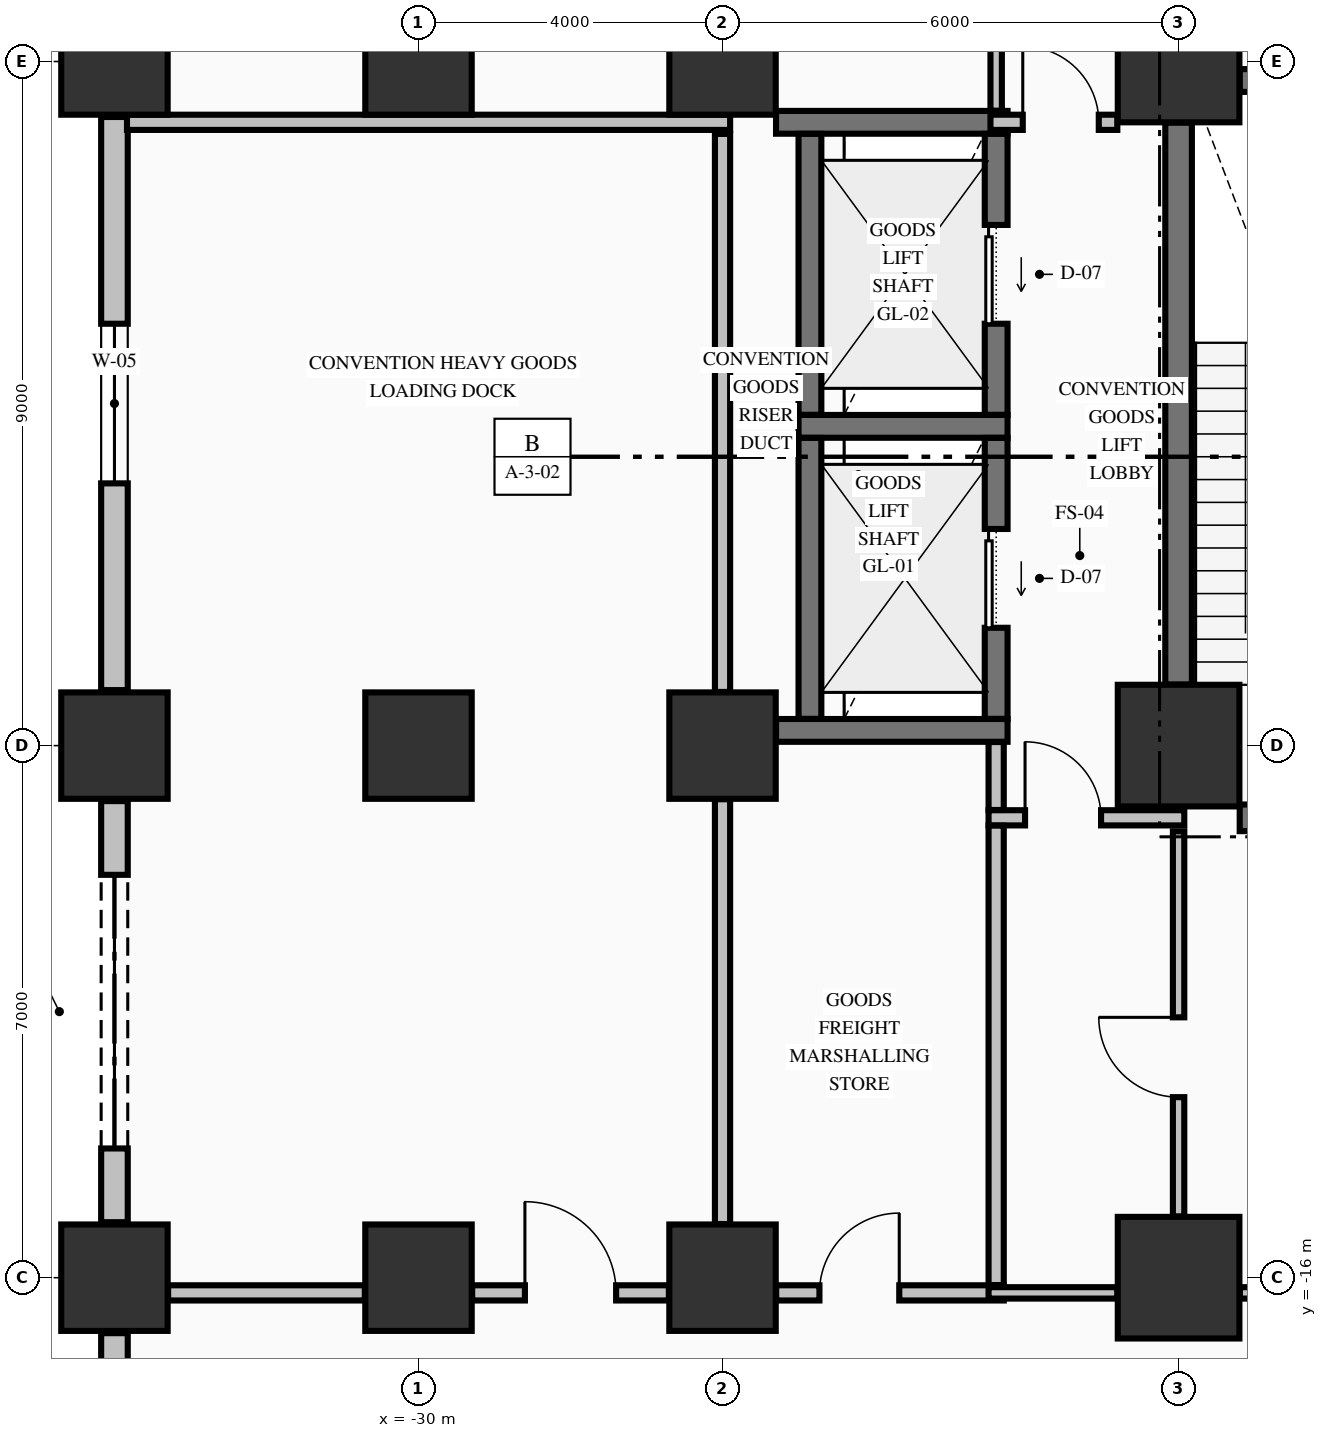
"""IFC4 building model, lengths in metres.
Left out: names, types, materials, properties, quantities, classifications, styles, units other than length and angle.
Written with IfcOpenShell. Run it as: python <this file> out.ifc"""

import sys

from ifc_helpers import new_model, si_unit, direction, frame, frame_2d, origin, origin_2d, place, context, subcontext, project, spatial, rectangle, extrude, element, fill, save


model = new_model("IFC4")
c1 = context("Model", 3, precision=1e-05, world=origin(), true_north=direction((0.0, 1.0)))
c2 = subcontext(c1, "Body", "Model", "MODEL_VIEW")
j1 = project(units=[si_unit("LENGTHUNIT", "METRE"), si_unit("PLANEANGLEUNIT", "RADIAN")], contexts=[c1])
p1 = place(None, origin())
s1 = spatial("IfcSite", under=j1, at=p1, CompositionType="ELEMENT")
p2 = place(p1, origin())
s2 = spatial("IfcBuilding", under=s1, at=p2, CompositionType="ELEMENT")
p3 = place(p2, origin())
s3 = spatial("IfcBuildingStorey", under=s2, at=p3, CompositionType="ELEMENT", Elevation=0.0)
for number, where, z_axis, x_axis in (
    (1, (-34.0, -16.0, 0.0), (0.0, 0.0, 1.0), (1.0, 0.0, 0.0)),
    (2, (-34.0, -9.0, 0.0), (0.0, 0.0, 1.0), (1.0, 0.0, 0.0)),
    (3, (-34.0, 0.0, 0.0), (0.0, 0.0, 1.0), (1.0, 0.0, 0.0)),
    (4, (-30.0, -16.0, 0.0), (0.0, 0.0, 1.0), (1.0, 0.0, 0.0)),
    (5, (-30.0, -9.0, 0.0), (0.0, 0.0, 1.0), (1.0, 0.0, 0.0)),
    (6, (-30.0, 0.0, 0.0), (0.0, 0.0, 1.0), (1.0, 0.0, 0.0)),
    (7, (-26.0, -16.0, 0.0), (0.0, 0.0, 1.0), (1.0, 0.0, 0.0)),
    (8, (-26.0, -9.0, 0.0), (0.0, 0.0, 1.0), (1.0, 0.0, 0.0)),
    (9, (-26.0, 0.0, 0.0), (0.0, 0.0, 1.0), (1.0, 0.0, 0.0)),
):
    element("IfcColumn", number, at=place(p3, frame(where, z_axis=z_axis, x_axis=x_axis)), inside=s3, PredefinedType="COLUMN", context=c2, shape_type="SweptSolid", body=[
        extrude(rectangle(XDim=1.4, YDim=1.4, at=origin_2d()), origin(), (0.0, 0.0, 1.0), 5.09),
    ])
for number, where, z_axis, x_axis in (
    (10, (-20.0, -16.0, 0.0), (0.0, 0.0, 1.0), (1.0, 0.0, 0.0)),
    (11, (-20.0, -9.0, 0.0), (0.0, 0.0, 1.0), (1.0, 0.0, 0.0)),
    (12, (-20.0, 0.0, 0.0), (0.0, 0.0, 1.0), (1.0, 0.0, 0.0)),
):
    element("IfcColumn", number, at=place(p3, frame(where, z_axis=z_axis, x_axis=x_axis)), inside=s3, PredefinedType="COLUMN", context=c2, shape_type="SweptSolid", body=[
        extrude(rectangle(XDim=1.6, YDim=1.6, at=origin_2d()), origin(), (0.0, 0.0, 1.0), 5.09),
    ])
p4 = place(p3, frame((-34.0, -21.27, 0.0), z_axis=(0.0, 0.0, 1.0), x_axis=(0.0, 1.0, 0.0)))
e13 = element("IfcWall", 13, at=p4, inside=s3, PredefinedType="STANDARD", context=c2, shape_type="SweptSolid", body=[
    extrude(rectangle(XDim=4.54, YDim=0.35, at=frame_2d((2.27, 0.0))), origin(), (0.0, 0.0, 1.0), 5.09),
])
p5 = place(p4, frame((0.87, 0.0, 0.0)))
e14 = element("IfcOpeningElement", 14, at=p5, cuts=e13, PredefinedType="OPENING", context=c2, shape_type="SweptSolid", body=[
    extrude(rectangle(XDim=1.2, YDim=2.2, at=frame_2d((0.6, 1.1))), frame((0.0, 0.185, 0.0), z_axis=(0.0, -1.0, 0.0), x_axis=(1.0, 0.0, 0.0)), (0.0, 0.0, 1.0), 0.37),
])
p6 = place(p3, frame((-34.0, -15.27, 0.0), z_axis=(0.0, 0.0, 1.0), x_axis=(0.0, 1.0, 0.0)))
e15 = element("IfcWall", 15, at=p6, inside=s3, PredefinedType="STANDARD", context=c2, shape_type="SweptSolid", body=[
    extrude(rectangle(XDim=5.54, YDim=0.35, at=frame_2d((2.77, 0.0))), origin(), (0.0, 0.0, 1.0), 4.482),
])
p7 = place(p6, frame((0.97, 0.0, 0.0)))
e16 = element("IfcOpeningElement", 16, at=p7, cuts=e15, PredefinedType="OPENING", context=c2, shape_type="SweptSolid", body=[
    extrude(rectangle(XDim=3.6, YDim=3.2, at=frame_2d((1.8, 1.6))), frame((0.0, 0.185, 0.0), z_axis=(0.0, -1.0, 0.0), x_axis=(1.0, 0.0, 0.0)), (0.0, 0.0, 1.0), 0.37),
])
p8 = place(p3, frame((-34.0, -8.27, 0.0), z_axis=(0.0, 0.0, 1.0), x_axis=(0.0, 1.0, 0.0)))
e17 = element("IfcWall", 17, at=p8, inside=s3, PredefinedType="STANDARD", context=c2, shape_type="SweptSolid", body=[
    extrude(rectangle(XDim=7.54, YDim=0.35, at=frame_2d((3.77, 0.0))), origin(), (0.0, 0.0, 1.0), 4.482),
])
p9 = place(p8, frame((2.72, 0.0, 0.75)))
e18 = element("IfcOpeningElement", 18, at=p9, cuts=e17, PredefinedType="OPENING", context=c2, shape_type="SweptSolid", body=[
    extrude(rectangle(XDim=2.1, YDim=1.75, at=frame_2d((1.05, 0.875))), frame((0.0, 0.185, 0.0), z_axis=(0.0, -1.0, 0.0), x_axis=(1.0, 0.0, 0.0)), (0.0, 0.0, 1.0), 0.37),
])
p10 = place(p3, frame((-19.196, -9.95, 0.0), z_axis=(0.0, 0.0, 1.0), x_axis=(1.0, 0.0, 0.0)))
e19 = element("IfcWall", 19, at=p10, inside=s3, PredefinedType="SHEAR", context=c2, shape_type="SweptSolid", body=[
    extrude(rectangle(XDim=4.496, YDim=0.35, at=frame_2d((2.248, 0.0))), origin(), (0.0, 0.0, 1.0), 5.09),
])
p11 = place(p10, frame((0.371, 0.0, 0.0)))
e20 = element("IfcOpeningElement", 20, at=p11, cuts=e19, PredefinedType="OPENING", context=c2, shape_type="SweptSolid", body=[
    extrude(rectangle(XDim=1.05, YDim=2.15, at=frame_2d((0.525, 1.075))), frame((0.0, 0.185, 0.0), z_axis=(0.0, -1.0, 0.0), x_axis=(1.0, 0.0, 0.0)), (0.0, 0.0, 1.0), 0.37),
])
p12 = place(p3, frame((-25.296, -8.8, 0.0), z_axis=(0.0, 0.0, 1.0), x_axis=(1.0, 0.0, 0.0)))
e21 = element("IfcWall", 21, at=p12, inside=s3, PredefinedType="SHEAR", context=c2, shape_type="SweptSolid", body=[
    extrude(rectangle(XDim=3.046, YDim=0.3, at=frame_2d((1.523, 0.0))), origin(), (0.0, 0.0, 1.0), 5.09),
])
p13 = place(p3, frame((-25.0, -4.8, 0.0), z_axis=(0.0, 0.0, 1.0), x_axis=(1.0, 0.0, 0.0)))
e22 = element("IfcWall", 22, at=p13, inside=s3, PredefinedType="SHEAR", context=c2, shape_type="SweptSolid", body=[
    extrude(rectangle(XDim=2.75, YDim=0.3, at=frame_2d((1.375, 0.0))), origin(), (0.0, 0.0, 1.0), 5.09),
])
p14 = place(p3, frame((-25.296, -0.8, 0.0), z_axis=(0.0, 0.0, 1.0), x_axis=(1.0, 0.0, 0.0)))
e23 = element("IfcWall", 23, at=p14, inside=s3, PredefinedType="SHEAR", context=c2, shape_type="SweptSolid", body=[
    extrude(rectangle(XDim=3.046, YDim=0.3, at=frame_2d((1.523, 0.0))), origin(), (0.0, 0.0, 1.0), 5.09),
])
p15 = place(p3, frame((-19.196, -0.25, 0.0), z_axis=(0.0, 0.0, 1.0), x_axis=(1.0, 0.0, 0.0)))
e24 = element("IfcWall", 24, at=p15, inside=s3, PredefinedType="SHEAR", context=c2, shape_type="SweptSolid", body=[
    extrude(rectangle(XDim=7.392, YDim=0.3, at=frame_2d((3.696, 0.0))), origin(), (0.0, 0.0, 1.0), 5.09),
])
p16 = place(p15, frame((5.496, 0.0, 0.0)))
e25 = element("IfcOpeningElement", 25, at=p16, cuts=e24, PredefinedType="OPENING", context=c2, shape_type="SweptSolid", body=[
    extrude(rectangle(XDim=1.1, YDim=2.15, at=frame_2d((0.55, 1.075))), frame((0.0, 0.16, 0.0), z_axis=(0.0, -1.0, 0.0), x_axis=(1.0, 0.0, 0.0)), (0.0, 0.0, 1.0), 0.32),
])
p17 = place(p3, frame((-33.294, -16.2, 0.0), z_axis=(0.0, 0.0, 1.0), x_axis=(1.0, 0.0, 0.0)))
e26 = element("IfcWall", 26, at=p17, inside=s3, PredefinedType="PARTITIONING", context=c2, shape_type="SweptSolid", body=[
    extrude(rectangle(XDim=2.588, YDim=0.2, at=frame_2d((1.294, 0.0))), origin(), (0.0, 0.0, 1.0), 4.132),
])
p18 = place(p3, frame((-29.294, -16.2, 0.0), z_axis=(0.0, 0.0, 1.0), x_axis=(1.0, 0.0, 0.0)))
e27 = element("IfcWall", 27, at=p18, inside=s3, PredefinedType="PARTITIONING", context=c2, shape_type="SweptSolid", body=[
    extrude(rectangle(XDim=2.588, YDim=0.2, at=frame_2d((1.294, 0.0))), origin(), (0.0, 0.0, 1.0), 4.132),
])
p19 = place(p18, frame((0.694, 0.0, 0.0)))
e28 = element("IfcOpeningElement", 28, at=p19, cuts=e27, PredefinedType="OPENING", context=c2, shape_type="SweptSolid", body=[
    extrude(rectangle(XDim=1.2, YDim=2.15, at=frame_2d((0.6, 1.075))), frame((0.0, 0.11, 0.0), z_axis=(0.0, -1.0, 0.0), x_axis=(1.0, 0.0, 0.0)), (0.0, 0.0, 1.0), 0.22),
])
p20 = place(p3, frame((-25.294, -16.2, 0.0), z_axis=(0.0, 0.0, 1.0), x_axis=(1.0, 0.0, 0.0)))
e29 = element("IfcWall", 29, at=p20, inside=s3, PredefinedType="PARTITIONING", context=c2, shape_type="SweptSolid", body=[
    extrude(rectangle(XDim=2.994, YDim=0.2, at=frame_2d((1.497, 0.0))), origin(), (0.0, 0.0, 1.0), 4.132),
])
p21 = place(p20, frame((0.569, 0.0, 0.0)))
e30 = element("IfcOpeningElement", 30, at=p21, cuts=e29, PredefinedType="OPENING", context=c2, shape_type="SweptSolid", body=[
    extrude(rectangle(XDim=1.05, YDim=2.15, at=frame_2d((0.525, 1.075))), frame((0.0, 0.11, 0.0), z_axis=(0.0, -1.0, 0.0), x_axis=(1.0, 0.0, 0.0)), (0.0, 0.0, 1.0), 0.22),
])
p22 = place(p3, frame((-22.5, -16.2, 0.0), z_axis=(0.0, 0.0, 1.0), x_axis=(1.0, 0.0, 0.0)))
e31 = element("IfcWall", 31, at=p22, inside=s3, PredefinedType="PARTITIONING", context=c2, shape_type="SweptSolid", body=[
    extrude(rectangle(XDim=1.694, YDim=0.15, at=frame_2d((0.847, 0.0))), origin(), (0.0, 0.0, 1.0), 4.132),
])
p23 = place(p3, frame((-19.194, -16.2, 0.0), z_axis=(0.0, 0.0, 1.0), x_axis=(1.0, 0.0, 0.0)))
e32 = element("IfcWall", 32, at=p23, inside=s3, PredefinedType="PARTITIONING", context=c2, shape_type="SweptSolid", body=[
    extrude(rectangle(XDim=7.388, YDim=0.15, at=frame_2d((3.694, 0.0))), origin(), (0.0, 0.0, 1.0), 4.132),
])
p24 = place(p23, frame((3.094, 0.0, 0.0)))
e33 = element("IfcOpeningElement", 33, at=p24, cuts=e32, PredefinedType="OPENING", context=c2, shape_type="SweptSolid", body=[
    extrude(rectangle(XDim=1.2, YDim=2.15, at=frame_2d((0.6, 1.075))), frame((0.0, 0.085, 0.0), z_axis=(0.0, -1.0, 0.0), x_axis=(1.0, 0.0, 0.0)), (0.0, 0.0, 1.0), 0.17),
])
p25 = place(p3, frame((-22.5, -9.95, 0.0), z_axis=(0.0, 0.0, 1.0), x_axis=(1.0, 0.0, 0.0)))
e34 = element("IfcWall", 34, at=p25, inside=s3, PredefinedType="PARTITIONING", context=c2, shape_type="SweptSolid", body=[
    extrude(rectangle(XDim=2.575, YDim=0.2, at=frame_2d((1.288, 0.0))), origin(), (0.0, 0.0, 1.0), 5.09),
])
p26 = place(p25, frame((0.48, 0.0, 0.0)))
e35 = element("IfcOpeningElement", 35, at=p26, cuts=e34, PredefinedType="OPENING", context=c2, shape_type="SweptSolid", body=[
    extrude(rectangle(XDim=1.0, YDim=2.15, at=frame_2d((0.5, 1.075))), frame((0.0, 0.11, 0.0), z_axis=(0.0, -1.0, 0.0), x_axis=(1.0, 0.0, 0.0)), (0.0, 0.0, 1.0), 0.22),
])
p27 = place(p3, frame((-33.835, -0.8, 0.0), z_axis=(0.0, 0.0, 1.0), x_axis=(1.0, 0.0, 0.0)))
e36 = element("IfcWall", 36, at=p27, inside=s3, PredefinedType="PARTITIONING", context=c2, shape_type="SweptSolid", body=[
    extrude(rectangle(XDim=7.935, YDim=0.2, at=frame_2d((3.968, 0.0))), origin(), (0.0, 0.0, 1.0), 5.09),
])
p28 = place(p3, frame((-22.475, -0.8, 0.0), z_axis=(0.0, 0.0, 1.0), x_axis=(1.0, 0.0, 0.0)))
e37 = element("IfcWall", 37, at=p28, inside=s3, PredefinedType="PARTITIONING", context=c2, shape_type="SweptSolid", body=[
    extrude(rectangle(XDim=1.669, YDim=0.2, at=frame_2d((0.834, 0.0))), origin(), (0.0, 0.0, 1.0), 5.09),
])
p29 = place(p28, frame((0.425, 0.0, 0.0)))
e38 = element("IfcOpeningElement", 38, at=p29, cuts=e37, PredefinedType="OPENING", context=c2, shape_type="SweptSolid", body=[
    extrude(rectangle(XDim=1.0, YDim=2.15, at=frame_2d((0.5, 1.075))), frame((0.0, 0.11, 0.0), z_axis=(0.0, -1.0, 0.0), x_axis=(1.0, 0.0, 0.0)), (0.0, 0.0, 1.0), 0.22),
])
for number, where, z_axis, x_axis in (
    (39, (-24.85, -8.648, 0.0), (0.0, 0.0, 1.0), (0.0, 1.0, 0.0)),
    (40, (-24.85, -4.648, 0.0), (0.0, 0.0, 1.0), (0.0, 1.0, 0.0)),
):
    element("IfcWall", number, at=place(p3, frame(where, z_axis=z_axis, x_axis=x_axis)), inside=s3, PredefinedType="SHEAR", context=c2, shape_type="SweptSolid", body=[
        extrude(rectangle(XDim=3.696, YDim=0.3, at=frame_2d((1.848, 0.0))), origin(), (0.0, 0.0, 1.0), 5.09),
    ])
p30 = place(p3, frame((-22.4, -8.648, 0.0), z_axis=(0.0, 0.0, 1.0), x_axis=(0.0, 1.0, 0.0)))
e41 = element("IfcWall", 41, at=p30, inside=s3, PredefinedType="SHEAR", context=c2, shape_type="SweptSolid", body=[
    extrude(rectangle(XDim=3.696, YDim=0.3, at=frame_2d((1.848, 0.0))), origin(), (0.0, 0.0, 1.0), 5.09),
])
p31 = place(p30, frame((1.198, 0.0, 0.0)))
e42 = element("IfcOpeningElement", 42, at=p31, cuts=e41, PredefinedType="OPENING", context=c2, shape_type="SweptSolid", body=[
    extrude(rectangle(XDim=1.3, YDim=2.3, at=frame_2d((0.65, 1.15))), frame((0.0, 0.16, 0.0), z_axis=(0.0, -1.0, 0.0), x_axis=(1.0, 0.0, 0.0)), (0.0, 0.0, 1.0), 0.32),
])
p32 = place(p3, frame((-22.4, -4.648, 0.0), z_axis=(0.0, 0.0, 1.0), x_axis=(0.0, 1.0, 0.0)))
e43 = element("IfcWall", 43, at=p32, inside=s3, PredefinedType="SHEAR", context=c2, shape_type="SweptSolid", body=[
    extrude(rectangle(XDim=3.696, YDim=0.3, at=frame_2d((1.848, 0.0))), origin(), (0.0, 0.0, 1.0), 5.09),
])
p33 = place(p32, frame((1.198, 0.0, 0.0)))
e44 = element("IfcOpeningElement", 44, at=p33, cuts=e43, PredefinedType="OPENING", context=c2, shape_type="SweptSolid", body=[
    extrude(rectangle(XDim=1.3, YDim=2.3, at=frame_2d((0.65, 1.15))), frame((0.0, 0.16, 0.0), z_axis=(0.0, -1.0, 0.0), x_axis=(1.0, 0.0, 0.0)), (0.0, 0.0, 1.0), 0.32),
])
p34 = place(p3, frame((-20.0, -8.196, 0.0), z_axis=(0.0, 0.0, 1.0), x_axis=(0.0, 1.0, 0.0)))
e45 = element("IfcWall", 45, at=p34, inside=s3, PredefinedType="SHEAR", context=c2, shape_type="SweptSolid", body=[
    extrude(rectangle(XDim=7.392, YDim=0.35, at=frame_2d((3.696, 0.0))), origin(), (0.0, 0.0, 1.0), 5.09),
])
p35 = place(p3, frame((-26.0, -15.294, 0.0), z_axis=(0.0, 0.0, 1.0), x_axis=(0.0, 1.0, 0.0)))
e46 = element("IfcWall", 46, at=p35, inside=s3, PredefinedType="PARTITIONING", context=c2, shape_type="SweptSolid", body=[
    extrude(rectangle(XDim=5.588, YDim=0.2, at=frame_2d((2.794, 0.0))), origin(), (0.0, 0.0, 1.0), 4.132),
])
p36 = place(p3, frame((-26.0, -8.294, 0.0), z_axis=(0.0, 0.0, 1.0), x_axis=(0.0, 1.0, 0.0)))
e47 = element("IfcWall", 47, at=p36, inside=s3, PredefinedType="PARTITIONING", context=c2, shape_type="SweptSolid", body=[
    extrude(rectangle(XDim=7.341, YDim=0.2, at=frame_2d((3.67, 0.0))), origin(), (0.0, 0.0, 1.0), 4.132),
])
p37 = place(p3, frame((-22.4, -16.097, 0.0), z_axis=(0.0, 0.0, 1.0), x_axis=(0.0, 1.0, 0.0)))
e48 = element("IfcWall", 48, at=p37, inside=s3, PredefinedType="PARTITIONING", context=c2, shape_type="SweptSolid", body=[
    extrude(rectangle(XDim=6.044, YDim=0.2, at=frame_2d((3.022, 0.0))), origin(), (0.0, 0.0, 1.0), 5.09),
])
p38 = place(p3, frame((-22.4, -9.847, 0.0), z_axis=(0.0, 0.0, 1.0), x_axis=(0.0, 1.0, 0.0)))
e49 = element("IfcWall", 49, at=p38, inside=s3, PredefinedType="PARTITIONING", context=c2, shape_type="SweptSolid", body=[
    extrude(rectangle(XDim=0.894, YDim=0.2, at=frame_2d((0.447, 0.0))), origin(), (0.0, 0.0, 1.0), 5.09),
])
p39 = place(p3, frame((-22.4, -0.647, 0.0), z_axis=(0.0, 0.0, 1.0), x_axis=(0.0, 1.0, 0.0)))
e50 = element("IfcWall", 50, at=p39, inside=s3, PredefinedType="PARTITIONING", context=c2, shape_type="SweptSolid", body=[
    extrude(rectangle(XDim=16.569, YDim=0.15, at=frame_2d((8.285, 0.0))), origin(), (0.0, 0.0, 1.0), 5.09),
])
p40 = place(p39, frame((4.547, 0.0, 0.0)))
e51 = element("IfcOpeningElement", 51, at=p40, cuts=e50, PredefinedType="OPENING", context=c2, shape_type="SweptSolid", body=[
    extrude(rectangle(XDim=1.2, YDim=2.15, at=frame_2d((0.6, 1.075))), frame((0.0, 0.085, 0.0), z_axis=(0.0, -1.0, 0.0), x_axis=(1.0, 0.0, 0.0)), (0.0, 0.0, 1.0), 0.17),
])
p41 = place(p39, frame((12.547, 0.0, 0.0)))
e52 = element("IfcOpeningElement", 52, at=p41, cuts=e50, PredefinedType="OPENING", context=c2, shape_type="SweptSolid", body=[
    extrude(rectangle(XDim=1.2, YDim=2.15, at=frame_2d((0.6, 1.075))), frame((0.0, 0.085, 0.0), z_axis=(0.0, -1.0, 0.0), x_axis=(1.0, 0.0, 0.0)), (0.0, 0.0, 1.0), 0.17),
])
p42 = place(p3, frame((-20.0, -15.194, 0.0), z_axis=(0.0, 0.0, 1.0), x_axis=(0.0, 1.0, 0.0)))
e53 = element("IfcWall", 53, at=p42, inside=s3, PredefinedType="PARTITIONING", context=c2, shape_type="SweptSolid", body=[
    extrude(rectangle(XDim=5.066, YDim=0.15, at=frame_2d((2.533, 0.0))), origin(), (0.0, 0.0, 1.0), 5.09),
])
p43 = place(p42, frame((1.569, 0.0, 0.0)))
e54 = element("IfcOpeningElement", 54, at=p43, cuts=e53, PredefinedType="OPENING", context=c2, shape_type="SweptSolid", body=[
    extrude(rectangle(XDim=1.05, YDim=2.15, at=frame_2d((0.525, 1.075))), frame((0.0, 0.085, 0.0), z_axis=(0.0, -1.0, 0.0), x_axis=(1.0, 0.0, 0.0)), (0.0, 0.0, 1.0), 0.17),
])
p44 = place(p7, origin())
e55 = element("IfcDoor", 55, at=p44, inside=s3, OperationType="ROLLINGUP", PredefinedType="DOOR", context=c2, shape_type="SweptSolid", body=[
    extrude(rectangle(XDim=3.6, YDim=3.2, at=frame_2d((1.8, 1.6))), frame((0.0, 0.025, 0.0), z_axis=(0.0, -1.0, 0.0), x_axis=(1.0, 0.0, 0.0)), (0.0, 0.0, 1.0), 0.05),
])
fill(e16, e55)
p45 = place(p9, origin())
e56 = element("IfcWindow", 56, at=p45, inside=s3, PartitioningType="SINGLE_PANEL", PredefinedType="WINDOW", context=c2, shape_type="SweptSolid", body=[
    extrude(rectangle(XDim=2.1, YDim=1.75, at=frame_2d((1.05, 0.875))), frame((0.0, 0.03, 0.0), z_axis=(0.0, -1.0, 0.0), x_axis=(1.0, 0.0, 0.0)), (0.0, 0.0, 1.0), 0.06),
])
fill(e18, e56)
p46 = place(p31, origin())
e57 = element("IfcDoor", 57, at=p46, inside=s3, OperationType="SLIDING_TO_LEFT", PredefinedType="DOOR", context=c2, shape_type="SweptSolid", body=[
    extrude(rectangle(XDim=1.3, YDim=2.3, at=frame_2d((0.65, 1.15))), frame((0.0, 0.025, 0.0), z_axis=(0.0, -1.0, 0.0), x_axis=(1.0, 0.0, 0.0)), (0.0, 0.0, 1.0), 0.05),
])
fill(e42, e57)
p47 = place(p33, origin())
e58 = element("IfcDoor", 58, at=p47, inside=s3, OperationType="SLIDING_TO_LEFT", PredefinedType="DOOR", context=c2, shape_type="SweptSolid", body=[
    extrude(rectangle(XDim=1.3, YDim=2.3, at=frame_2d((0.65, 1.15))), frame((0.0, 0.025, 0.0), z_axis=(0.0, -1.0, 0.0), x_axis=(1.0, 0.0, 0.0)), (0.0, 0.0, 1.0), 0.05),
])
fill(e44, e58)
p48 = place(p29, origin())
e59 = element("IfcDoor", 59, at=p48, inside=s3, OperationType="SINGLE_SWING_LEFT", PredefinedType="DOOR", context=c2, shape_type="SweptSolid", body=[
    extrude(rectangle(XDim=1.0, YDim=2.15, at=frame_2d((0.5, 1.075))), frame((0.0, 0.025, 0.0), z_axis=(0.0, -1.0, 0.0), x_axis=(1.0, 0.0, 0.0)), (0.0, 0.0, 1.0), 0.05),
])
fill(e38, e59)
p49 = place(p26, origin())
e60 = element("IfcDoor", 60, at=p49, inside=s3, OperationType="SINGLE_SWING_LEFT", PredefinedType="DOOR", context=c2, shape_type="SweptSolid", body=[
    extrude(rectangle(XDim=1.0, YDim=2.15, at=frame_2d((0.5, 1.075))), frame((0.0, 0.025, 0.0), z_axis=(0.0, -1.0, 0.0), x_axis=(1.0, 0.0, 0.0)), (0.0, 0.0, 1.0), 0.05),
])
fill(e35, e60)
p50 = place(p43, origin())
e61 = element("IfcDoor", 61, at=p50, inside=s3, OperationType="SINGLE_SWING_RIGHT", PredefinedType="DOOR", context=c2, shape_type="SweptSolid", body=[
    extrude(rectangle(XDim=1.05, YDim=2.15, at=frame_2d((0.525, 1.075))), frame((0.0, 0.025, 0.0), z_axis=(0.0, -1.0, 0.0), x_axis=(1.0, 0.0, 0.0)), (0.0, 0.0, 1.0), 0.05),
])
fill(e54, e61)
p51 = place(p19, origin())
e62 = element("IfcDoor", 62, at=p51, inside=s3, OperationType="SINGLE_SWING_LEFT", PredefinedType="DOOR", context=c2, shape_type="SweptSolid", body=[
    extrude(rectangle(XDim=1.2, YDim=2.15, at=frame_2d((0.6, 1.075))), frame((0.0, 0.025, 0.0), z_axis=(0.0, -1.0, 0.0), x_axis=(1.0, 0.0, 0.0)), (0.0, 0.0, 1.0), 0.05),
])
fill(e28, e62)
p52 = place(p21, origin())
e63 = element("IfcDoor", 63, at=p52, inside=s3, OperationType="SINGLE_SWING_RIGHT", PredefinedType="DOOR", context=c2, shape_type="SweptSolid", body=[
    extrude(rectangle(XDim=1.05, YDim=2.15, at=frame_2d((0.525, 1.075))), frame((0.0, 0.025, 0.0), z_axis=(0.0, -1.0, 0.0), x_axis=(1.0, 0.0, 0.0)), (0.0, 0.0, 1.0), 0.05),
])
fill(e30, e63)
save(model, sys.argv[1])
